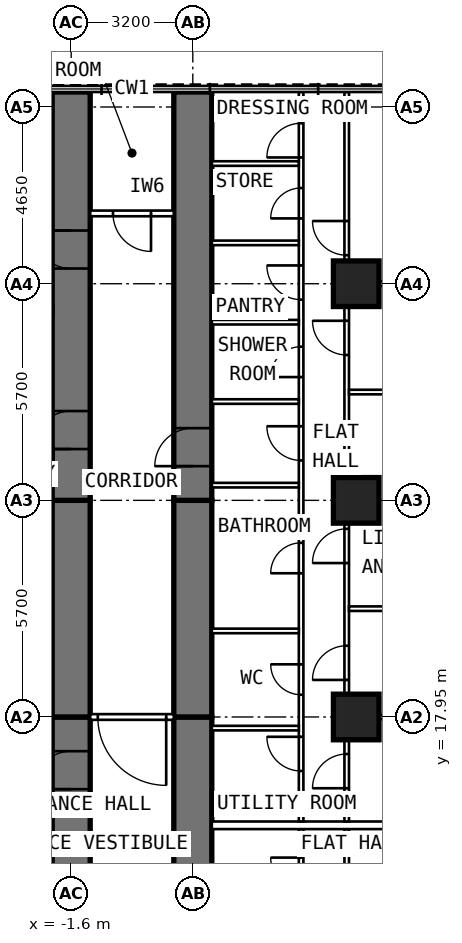
"""IFC4 building model, lengths in metres.
Left out: names, types, materials, properties, quantities, classifications, styles, units other than length and angle.
Written with IfcOpenShell. Run it as: python <this file> out.ifc"""

import sys

from ifc_helpers import new_model, si_unit, direction, frame, frame_2d, origin, origin_2d, place, context, subcontext, project, spatial, rectangle, extrude, element, fill, save


model = new_model("IFC4")
c1 = context("Model", 3, precision=1e-05, world=origin(), true_north=direction((0.0, 1.0)))
c2 = subcontext(c1, "Body", "Model", "MODEL_VIEW")
j1 = project(units=[si_unit("LENGTHUNIT", "METRE"), si_unit("PLANEANGLEUNIT", "RADIAN")], contexts=[c1])
p1 = place(None, origin())
s1 = spatial("IfcSite", under=j1, at=p1, CompositionType="ELEMENT")
p2 = place(p1, origin())
s2 = spatial("IfcBuilding", under=s1, at=p2, CompositionType="ELEMENT")
p3 = place(p2, frame((0.0, 0.0, 61.0)))
s3 = spatial("IfcBuildingStorey", under=s2, at=p3, CompositionType="ELEMENT", Elevation=61.0)
for number, where, z_axis, x_axis in (
    (1, (5.9, 17.95, 0.0), (0.0, 0.0, 1.0), (0.0, 1.0, 0.0)),
    (2, (5.9, 23.65, 0.0), (0.0, 0.0, 1.0), (0.0, 1.0, 0.0)),
    (3, (5.9, 29.35, 0.0), (0.0, 0.0, 1.0), (0.0, 1.0, 0.0)),
):
    element("IfcColumn", number, at=place(p3, frame(where, z_axis=z_axis, x_axis=x_axis)), inside=s3, PredefinedType="COLUMN", context=c2, shape_type="SweptSolid", body=[
        extrude(rectangle(XDim=1.2, YDim=1.2, at=origin_2d()), origin(), (0.0, 0.0, 1.0), 3.6),
    ])
p4 = place(p3, frame((-1.6, 9.6, 0.0), z_axis=(0.0, 0.0, 1.0), x_axis=(0.0, 1.0, 0.0)))
e4 = element("IfcWall", 4, at=p4, inside=s3, PredefinedType="SHEAR", context=c2, shape_type="SweptSolid", body=[
    extrude(rectangle(XDim=8.35, YDim=1.0, at=frame_2d((4.175, 0.0))), origin(), (0.0, 0.0, 1.0), 3.6),
])
p5 = place(p4, frame((6.45, 0.0, 0.0)))
e5 = element("IfcOpeningElement", 5, at=p5, cuts=e4, PredefinedType="OPENING", context=c2, shape_type="SweptSolid", body=[
    extrude(rectangle(XDim=1.0, YDim=2.1, at=frame_2d((0.5, 1.05))), frame((0.0, 0.512, 0.0), z_axis=(0.0, -1.0, 0.0), x_axis=(1.0, 0.0, 0.0)), (0.0, 0.0, 1.0), 1.024),
])
p6 = place(p3, frame((-1.6, 17.95, 0.0), z_axis=(0.0, 0.0, 1.0), x_axis=(0.0, 1.0, 0.0)))
e6 = element("IfcWall", 6, at=p6, inside=s3, PredefinedType="SHEAR", context=c2, shape_type="SweptSolid", body=[
    extrude(rectangle(XDim=5.7, YDim=1.0, at=frame_2d((2.85, 0.0))), origin(), (0.0, 0.0, 1.0), 3.6),
])
p7 = place(p3, frame((-1.6, 23.65, 0.0), z_axis=(0.0, 0.0, 1.0), x_axis=(0.0, 1.0, 0.0)))
e7 = element("IfcWall", 7, at=p7, inside=s3, PredefinedType="SHEAR", context=c2, shape_type="SweptSolid", body=[
    extrude(rectangle(XDim=10.745, YDim=1.0, at=frame_2d((5.373, 0.0))), origin(), (0.0, 0.0, 1.0), 3.6),
])
p8 = place(p7, frame((6.1, 0.0, 0.0)))
e8 = element("IfcOpeningElement", 8, at=p8, cuts=e7, PredefinedType="OPENING", context=c2, shape_type="SweptSolid", body=[
    extrude(rectangle(XDim=1.0, YDim=2.1, at=frame_2d((0.5, 1.05))), frame((0.0, 0.512, 0.0), z_axis=(0.0, -1.0, 0.0), x_axis=(1.0, 0.0, 0.0)), (0.0, 0.0, 1.0), 1.024),
])
p9 = place(p7, frame((1.35, 0.0, 0.0)))
e9 = element("IfcOpeningElement", 9, at=p9, cuts=e7, PredefinedType="OPENING", context=c2, shape_type="SweptSolid", body=[
    extrude(rectangle(XDim=1.0, YDim=2.1, at=frame_2d((0.5, 1.05))), frame((0.0, 0.512, 0.0), z_axis=(0.0, -1.0, 0.0), x_axis=(1.0, 0.0, 0.0)), (0.0, 0.0, 1.0), 1.024),
])
p10 = place(p3, frame((1.6, 9.6, 0.0), z_axis=(0.0, 0.0, 1.0), x_axis=(0.0, 1.0, 0.0)))
e10 = element("IfcWall", 10, at=p10, inside=s3, PredefinedType="SHEAR", context=c2, shape_type="SweptSolid", body=[
    extrude(rectangle(XDim=8.35, YDim=1.0, at=frame_2d((4.175, 0.0))), origin(), (0.0, 0.0, 1.0), 3.6),
])
p11 = place(p10, frame((1.3, 0.0, 0.0)))
e11 = element("IfcOpeningElement", 11, at=p11, cuts=e10, PredefinedType="OPENING", context=c2, shape_type="SweptSolid", body=[
    extrude(rectangle(XDim=1.0, YDim=2.1, at=frame_2d((0.5, 1.05))), frame((0.0, 0.512, 0.0), z_axis=(0.0, -1.0, 0.0), x_axis=(1.0, 0.0, 0.0)), (0.0, 0.0, 1.0), 1.024),
])
p12 = place(p3, frame((1.6, 17.95, 0.0), z_axis=(0.0, 0.0, 1.0), x_axis=(0.0, 1.0, 0.0)))
e12 = element("IfcWall", 12, at=p12, inside=s3, PredefinedType="SHEAR", context=c2, shape_type="SweptSolid", body=[
    extrude(rectangle(XDim=5.7, YDim=1.0, at=frame_2d((2.85, 0.0))), origin(), (0.0, 0.0, 1.0), 3.6),
])
p13 = place(p3, frame((1.6, 23.65, 0.0), z_axis=(0.0, 0.0, 1.0), x_axis=(0.0, 1.0, 0.0)))
e13 = element("IfcWall", 13, at=p13, inside=s3, PredefinedType="SHEAR", context=c2, shape_type="SweptSolid", body=[
    extrude(rectangle(XDim=10.745, YDim=1.0, at=frame_2d((5.373, 0.0))), origin(), (0.0, 0.0, 1.0), 3.6),
])
p14 = place(p13, frame((0.9, 0.0, 0.0)))
e14 = element("IfcOpeningElement", 14, at=p14, cuts=e13, PredefinedType="OPENING", context=c2, shape_type="SweptSolid", body=[
    extrude(rectangle(XDim=1.0, YDim=2.1, at=frame_2d((0.5, 1.05))), frame((0.0, 0.512, 0.0), z_axis=(0.0, -1.0, 0.0), x_axis=(1.0, 0.0, 0.0)), (0.0, 0.0, 1.0), 1.024),
])
p15 = place(p3, frame((4.45, 10.1, 0.0), z_axis=(0.0, 0.0, 1.0), x_axis=(0.0, 1.0, 0.0)))
e15 = element("IfcWall", 15, at=p15, inside=s3, PredefinedType="PARTITIONING", context=c2, shape_type="SweptSolid", body=[
    extrude(rectangle(XDim=4.9, YDim=0.12, at=frame_2d((2.45, 0.0))), origin(), (0.0, 0.0, 1.0), 3.35),
])
p16 = place(p15, frame((0.75, 0.0, 0.0)))
e16 = element("IfcOpeningElement", 16, at=p16, cuts=e15, PredefinedType="OPENING", context=c2, shape_type="SweptSolid", body=[
    extrude(rectangle(XDim=0.9, YDim=2.1, at=frame_2d((0.45, 1.05))), frame((0.0, 0.072, 0.0), z_axis=(0.0, -1.0, 0.0), x_axis=(1.0, 0.0, 0.0)), (0.0, 0.0, 1.0), 0.144),
])
p17 = place(p15, frame((3.35, 0.0, 0.0)))
e17 = element("IfcOpeningElement", 17, at=p17, cuts=e15, PredefinedType="OPENING", context=c2, shape_type="SweptSolid", body=[
    extrude(rectangle(XDim=0.8, YDim=2.1, at=frame_2d((0.4, 1.05))), frame((0.0, 0.072, 0.0), z_axis=(0.0, -1.0, 0.0), x_axis=(1.0, 0.0, 0.0)), (0.0, 0.0, 1.0), 0.144),
])
p18 = place(p3, frame((5.65, 9.6, 0.0), z_axis=(0.0, 0.0, 1.0), x_axis=(0.0, 1.0, 0.0)))
e18 = element("IfcWall", 18, at=p18, inside=s3, PredefinedType="PARTITIONING", context=c2, shape_type="SweptSolid", body=[
    extrude(rectangle(XDim=5.4, YDim=0.12, at=frame_2d((2.7, 0.0))), origin(), (0.0, 0.0, 1.0), 3.35),
])
p19 = place(p18, frame((3.4, 0.0, 0.0)))
e19 = element("IfcOpeningElement", 19, at=p19, cuts=e18, PredefinedType="OPENING", context=c2, shape_type="SweptSolid", body=[
    extrude(rectangle(XDim=0.9, YDim=2.1, at=frame_2d((0.45, 1.05))), frame((0.0, 0.072, 0.0), z_axis=(0.0, -1.0, 0.0), x_axis=(1.0, 0.0, 0.0)), (0.0, 0.0, 1.0), 0.144),
])
p20 = place(p3, frame((4.45, 15.2, 0.0), z_axis=(0.0, 0.0, 1.0), x_axis=(0.0, 1.0, 0.0)))
e20 = element("IfcWall", 20, at=p20, inside=s3, PredefinedType="PARTITIONING", context=c2, shape_type="SweptSolid", body=[
    extrude(rectangle(XDim=19.195, YDim=0.12, at=frame_2d((9.598, 0.0))), origin(), (0.0, 0.0, 1.0), 3.35),
])
p21 = place(p20, frame((1.329, 0.0, 0.0)))
e21 = element("IfcOpeningElement", 21, at=p21, cuts=e20, PredefinedType="OPENING", context=c2, shape_type="SweptSolid", body=[
    extrude(rectangle(XDim=0.9, YDim=2.1, at=frame_2d((0.45, 1.05))), frame((0.0, 0.072, 0.0), z_axis=(0.0, -1.0, 0.0), x_axis=(1.0, 0.0, 0.0)), (0.0, 0.0, 1.0), 0.144),
])
p22 = place(p20, frame((3.336, 0.0, 0.0)))
e22 = element("IfcOpeningElement", 22, at=p22, cuts=e20, PredefinedType="OPENING", context=c2, shape_type="SweptSolid", body=[
    extrude(rectangle(XDim=0.8, YDim=2.1, at=frame_2d((0.4, 1.05))), frame((0.0, 0.072, 0.0), z_axis=(0.0, -1.0, 0.0), x_axis=(1.0, 0.0, 0.0)), (0.0, 0.0, 1.0), 0.144),
])
p23 = place(p20, frame((6.532, 0.0, 0.0)))
e23 = element("IfcOpeningElement", 23, at=p23, cuts=e20, PredefinedType="OPENING", context=c2, shape_type="SweptSolid", body=[
    extrude(rectangle(XDim=0.8, YDim=2.1, at=frame_2d((0.4, 1.05))), frame((0.0, 0.072, 0.0), z_axis=(0.0, -1.0, 0.0), x_axis=(1.0, 0.0, 0.0)), (0.0, 0.0, 1.0), 0.144),
])
p24 = place(p20, frame((9.5, 0.0, 0.0)))
e24 = element("IfcOpeningElement", 24, at=p24, cuts=e20, PredefinedType="OPENING", context=c2, shape_type="SweptSolid", body=[
    extrude(rectangle(XDim=0.9, YDim=2.1, at=frame_2d((0.45, 1.05))), frame((0.0, 0.072, 0.0), z_axis=(0.0, -1.0, 0.0), x_axis=(1.0, 0.0, 0.0)), (0.0, 0.0, 1.0), 0.144),
])
p25 = place(p20, frame((11.694, 0.0, 0.0)))
e25 = element("IfcOpeningElement", 25, at=p25, cuts=e20, PredefinedType="OPENING", context=c2, shape_type="SweptSolid", body=[
    extrude(rectangle(XDim=0.8, YDim=2.1, at=frame_2d((0.4, 1.05))), frame((0.0, 0.072, 0.0), z_axis=(0.0, -1.0, 0.0), x_axis=(1.0, 0.0, 0.0)), (0.0, 0.0, 1.0), 0.144),
])
p26 = place(p20, frame((13.731, 0.0, 0.0)))
e26 = element("IfcOpeningElement", 26, at=p26, cuts=e20, PredefinedType="OPENING", context=c2, shape_type="SweptSolid", body=[
    extrude(rectangle(XDim=0.9, YDim=2.1, at=frame_2d((0.45, 1.05))), frame((0.0, 0.072, 0.0), z_axis=(0.0, -1.0, 0.0), x_axis=(1.0, 0.0, 0.0)), (0.0, 0.0, 1.0), 0.144),
])
p27 = place(p20, frame((15.869, 0.0, 0.0)))
e27 = element("IfcOpeningElement", 27, at=p27, cuts=e20, PredefinedType="OPENING", context=c2, shape_type="SweptSolid", body=[
    extrude(rectangle(XDim=0.8, YDim=2.1, at=frame_2d((0.4, 1.05))), frame((0.0, 0.072, 0.0), z_axis=(0.0, -1.0, 0.0), x_axis=(1.0, 0.0, 0.0)), (0.0, 0.0, 1.0), 0.144),
])
p28 = place(p20, frame((17.472, 0.0, 0.0)))
e28 = element("IfcOpeningElement", 28, at=p28, cuts=e20, PredefinedType="OPENING", context=c2, shape_type="SweptSolid", body=[
    extrude(rectangle(XDim=0.9, YDim=2.1, at=frame_2d((0.45, 1.05))), frame((0.0, 0.072, 0.0), z_axis=(0.0, -1.0, 0.0), x_axis=(1.0, 0.0, 0.0)), (0.0, 0.0, 1.0), 0.144),
])
p29 = place(p3, frame((5.65, 15.2, 0.0), z_axis=(0.0, 0.0, 1.0), x_axis=(0.0, 1.0, 0.0)))
e29 = element("IfcWall", 29, at=p29, inside=s3, PredefinedType="PARTITIONING", context=c2, shape_type="SweptSolid", body=[
    extrude(rectangle(XDim=19.195, YDim=0.12, at=frame_2d((9.598, 0.0))), origin(), (0.0, 0.0, 1.0), 3.35),
])
p30 = place(p29, frame((0.875, 0.0, 0.0)))
e30 = element("IfcOpeningElement", 30, at=p30, cuts=e29, PredefinedType="OPENING", context=c2, shape_type="SweptSolid", body=[
    extrude(rectangle(XDim=0.9, YDim=2.1, at=frame_2d((0.45, 1.05))), frame((0.0, 0.072, 0.0), z_axis=(0.0, -1.0, 0.0), x_axis=(1.0, 0.0, 0.0)), (0.0, 0.0, 1.0), 0.144),
])
p31 = place(p29, frame((3.725, 0.0, 0.0)))
e31 = element("IfcOpeningElement", 31, at=p31, cuts=e29, PredefinedType="OPENING", context=c2, shape_type="SweptSolid", body=[
    extrude(rectangle(XDim=0.9, YDim=2.1, at=frame_2d((0.45, 1.05))), frame((0.0, 0.072, 0.0), z_axis=(0.0, -1.0, 0.0), x_axis=(1.0, 0.0, 0.0)), (0.0, 0.0, 1.0), 0.144),
])
p32 = place(p29, frame((6.8, 0.0, 0.0)))
e32 = element("IfcOpeningElement", 32, at=p32, cuts=e29, PredefinedType="OPENING", context=c2, shape_type="SweptSolid", body=[
    extrude(rectangle(XDim=0.9, YDim=2.1, at=frame_2d((0.45, 1.05))), frame((0.0, 0.072, 0.0), z_axis=(0.0, -1.0, 0.0), x_axis=(1.0, 0.0, 0.0)), (0.0, 0.0, 1.0), 0.144),
])
p33 = place(p29, frame((12.275, 0.0, 0.0)))
e33 = element("IfcOpeningElement", 33, at=p33, cuts=e29, PredefinedType="OPENING", context=c2, shape_type="SweptSolid", body=[
    extrude(rectangle(XDim=0.9, YDim=2.1, at=frame_2d((0.45, 1.05))), frame((0.0, 0.072, 0.0), z_axis=(0.0, -1.0, 0.0), x_axis=(1.0, 0.0, 0.0)), (0.0, 0.0, 1.0), 0.144),
])
p34 = place(p29, frame((14.9, 0.0, 0.0)))
e34 = element("IfcOpeningElement", 34, at=p34, cuts=e29, PredefinedType="OPENING", context=c2, shape_type="SweptSolid", body=[
    extrude(rectangle(XDim=0.9, YDim=2.1, at=frame_2d((0.45, 1.05))), frame((0.0, 0.072, 0.0), z_axis=(0.0, -1.0, 0.0), x_axis=(1.0, 0.0, 0.0)), (0.0, 0.0, 1.0), 0.144),
])
p35 = place(p3, frame((5.71, 17.95, 0.0), z_axis=(0.0, 0.0, 1.0), x_axis=(1.0, 0.0, 0.0)))
e35 = element("IfcWall", 35, at=p35, inside=s3, PredefinedType="PARTITIONING", context=c2, shape_type="SweptSolid", body=[
    extrude(rectangle(XDim=4.99, YDim=0.12, at=frame_2d((2.495, 0.0))), origin(), (0.0, 0.0, 1.0), 2.45),
])
for number, where, z_axis, x_axis in (
    (36, (5.71, 20.8, 0.0), (0.0, 0.0, 1.0), (1.0, 0.0, 0.0)),
    (37, (5.71, 26.5, 0.0), (0.0, 0.0, 1.0), (1.0, 0.0, 0.0)),
):
    element("IfcWall", number, at=place(p3, frame(where, z_axis=z_axis, x_axis=x_axis)), inside=s3, PredefinedType="PARTITIONING", context=c2, shape_type="SweptSolid", body=[
        extrude(rectangle(XDim=4.99, YDim=0.12, at=frame_2d((2.495, 0.0))), origin(), (0.0, 0.0, 1.0), 3.35),
    ])
p36 = place(p3, frame((5.71, 29.35, 0.0), z_axis=(0.0, 0.0, 1.0), x_axis=(1.0, 0.0, 0.0)))
e38 = element("IfcWall", 38, at=p36, inside=s3, PredefinedType="PARTITIONING", context=c2, shape_type="SweptSolid", body=[
    extrude(rectangle(XDim=4.99, YDim=0.12, at=frame_2d((2.495, 0.0))), origin(), (0.0, 0.0, 1.0), 2.45),
])
p37 = place(p3, frame((2.1, 17.657, 0.0), z_axis=(0.0, 0.0, 1.0), x_axis=(1.0, 0.0, 0.0)))
e39 = element("IfcWall", 39, at=p37, inside=s3, PredefinedType="PARTITIONING", context=c2, shape_type="SweptSolid", body=[
    extrude(rectangle(XDim=2.29, YDim=0.12, at=frame_2d((1.145, 0.0))), origin(), (0.0, 0.0, 1.0), 2.45),
])
for number, where, z_axis, x_axis in (
    (40, (2.1, 20.214, 0.0), (0.0, 0.0, 1.0), (1.0, 0.0, 0.0)),
    (41, (2.1, 24.05, 0.0), (0.0, 0.0, 1.0), (1.0, 0.0, 0.0)),
    (42, (2.1, 26.25, 0.0), (0.0, 0.0, 1.0), (1.0, 0.0, 0.0)),
    (43, (2.1, 28.337, 0.0), (0.0, 0.0, 1.0), (1.0, 0.0, 0.0)),
    (44, (2.1, 30.425, 0.0), (0.0, 0.0, 1.0), (1.0, 0.0, 0.0)),
    (45, (2.1, 32.512, 0.0), (0.0, 0.0, 1.0), (1.0, 0.0, 0.0)),
):
    element("IfcWall", number, at=place(p3, frame(where, z_axis=z_axis, x_axis=x_axis)), inside=s3, PredefinedType="PARTITIONING", context=c2, shape_type="SweptSolid", body=[
        extrude(rectangle(XDim=2.29, YDim=0.12, at=frame_2d((1.145, 0.0))), origin(), (0.0, 0.0, 1.0), 3.35),
    ])
p38 = place(p3, frame((2.1, 15.1, 0.0), z_axis=(0.0, 0.0, 1.0), x_axis=(1.0, 0.0, 0.0)))
e46 = element("IfcWall", 46, at=p38, inside=s3, PredefinedType="PARTITIONING", context=c2, shape_type="SweptSolid", body=[
    extrude(rectangle(XDim=8.6, YDim=0.2, at=frame_2d((4.3, 0.0))), origin(), (0.0, 0.0, 1.0), 3.35),
])
p39 = place(p3, frame((1.1, 31.2, 0.0), z_axis=(0.0, 0.0, 1.0), x_axis=(-1.0, 0.0, 0.0)))
e47 = element("IfcWall", 47, at=p39, inside=s3, PredefinedType="PARTITIONING", context=c2, shape_type="SweptSolid", body=[
    extrude(rectangle(XDim=2.2, YDim=0.15, at=frame_2d((1.1, 0.0))), origin(), (0.0, 0.0, 1.0), 3.35),
])
p40 = place(p39, frame((0.6, 0.0, 0.0)))
e48 = element("IfcOpeningElement", 48, at=p40, cuts=e47, PredefinedType="OPENING", context=c2, shape_type="SweptSolid", body=[
    extrude(rectangle(XDim=1.0, YDim=2.1, at=frame_2d((0.5, 1.05))), frame((0.0, 0.087, 0.0), z_axis=(0.0, -1.0, 0.0), x_axis=(1.0, 0.0, 0.0)), (0.0, 0.0, 1.0), 0.174),
])
p41 = place(p3, frame((1.1, 17.95, 0.0), z_axis=(0.0, 0.0, 1.0), x_axis=(-1.0, 0.0, 0.0)))
e49 = element("IfcWall", 49, at=p41, inside=s3, PredefinedType="PARTITIONING", context=c2, shape_type="SweptSolid", body=[
    extrude(rectangle(XDim=2.2, YDim=0.15, at=frame_2d((1.1, 0.0))), origin(), (0.0, 0.0, 1.0), 3.35),
])
p42 = place(p41, frame((0.2, 0.0, 0.0)))
e50 = element("IfcOpeningElement", 50, at=p42, cuts=e49, PredefinedType="OPENING", context=c2, shape_type="SweptSolid", body=[
    extrude(rectangle(XDim=1.8, YDim=2.1, at=frame_2d((0.9, 1.05))), frame((0.0, 0.087, 0.0), z_axis=(0.0, -1.0, 0.0), x_axis=(1.0, 0.0, 0.0)), (0.0, 0.0, 1.0), 0.174),
])
p43 = place(p5, origin())
e51 = element("IfcDoor", 51, at=p43, inside=s3, OperationType="SINGLE_SWING_LEFT", PredefinedType="DOOR", context=c2, shape_type="SweptSolid", body=[
    extrude(rectangle(XDim=1.0, YDim=2.1, at=frame_2d((0.5, 1.05))), frame((0.0, 0.25, 0.0), z_axis=(0.0, -1.0, 0.0), x_axis=(1.0, 0.0, 0.0)), (0.0, 0.0, 1.0), 0.5),
])
fill(e5, e51)
p44 = place(p8, origin())
e52 = element("IfcDoor", 52, at=p44, inside=s3, OperationType="SINGLE_SWING_RIGHT", PredefinedType="DOOR", context=c2, shape_type="SweptSolid", body=[
    extrude(rectangle(XDim=1.0, YDim=2.1, at=frame_2d((0.5, 1.05))), frame((0.0, 0.25, 0.0), z_axis=(0.0, -1.0, 0.0), x_axis=(1.0, 0.0, 0.0)), (0.0, 0.0, 1.0), 0.5),
])
fill(e8, e52)
p45 = place(p17, origin())
e53 = element("IfcDoor", 53, at=p45, inside=s3, OperationType="SINGLE_SWING_RIGHT", PredefinedType="DOOR", context=c2, shape_type="SweptSolid", body=[
    extrude(rectangle(XDim=0.8, YDim=2.1, at=frame_2d((0.4, 1.05))), frame((0.0, 0.025, 0.0), z_axis=(0.0, -1.0, 0.0), x_axis=(1.0, 0.0, 0.0)), (0.0, 0.0, 1.0), 0.05),
])
fill(e17, e53)
p46 = place(p14, origin())
e54 = element("IfcDoor", 54, at=p46, inside=s3, OperationType="SINGLE_SWING_LEFT", PredefinedType="DOOR", context=c2, shape_type="SweptSolid", body=[
    extrude(rectangle(XDim=1.0, YDim=2.1, at=frame_2d((0.5, 1.05))), frame((0.0, 0.25, 0.0), z_axis=(0.0, -1.0, 0.0), x_axis=(1.0, 0.0, 0.0)), (0.0, 0.0, 1.0), 0.5),
])
fill(e14, e54)
p47 = place(p30, origin())
e55 = element("IfcDoor", 55, at=p47, inside=s3, OperationType="SINGLE_SWING_LEFT", PredefinedType="DOOR", context=c2, shape_type="SweptSolid", body=[
    extrude(rectangle(XDim=0.9, YDim=2.1, at=frame_2d((0.45, 1.05))), frame((0.0, 0.025, 0.0), z_axis=(0.0, -1.0, 0.0), x_axis=(1.0, 0.0, 0.0)), (0.0, 0.0, 1.0), 0.05),
])
fill(e30, e55)
p48 = place(p31, origin())
e56 = element("IfcDoor", 56, at=p48, inside=s3, OperationType="SINGLE_SWING_LEFT", PredefinedType="DOOR", context=c2, shape_type="SweptSolid", body=[
    extrude(rectangle(XDim=0.9, YDim=2.1, at=frame_2d((0.45, 1.05))), frame((0.0, 0.025, 0.0), z_axis=(0.0, -1.0, 0.0), x_axis=(1.0, 0.0, 0.0)), (0.0, 0.0, 1.0), 0.05),
])
fill(e31, e56)
p49 = place(p32, origin())
e57 = element("IfcDoor", 57, at=p49, inside=s3, OperationType="SINGLE_SWING_LEFT", PredefinedType="DOOR", context=c2, shape_type="SweptSolid", body=[
    extrude(rectangle(XDim=0.9, YDim=2.1, at=frame_2d((0.45, 1.05))), frame((0.0, 0.025, 0.0), z_axis=(0.0, -1.0, 0.0), x_axis=(1.0, 0.0, 0.0)), (0.0, 0.0, 1.0), 0.05),
])
fill(e32, e57)
p50 = place(p33, origin())
e58 = element("IfcDoor", 58, at=p50, inside=s3, OperationType="SINGLE_SWING_RIGHT", PredefinedType="DOOR", context=c2, shape_type="SweptSolid", body=[
    extrude(rectangle(XDim=0.9, YDim=2.1, at=frame_2d((0.45, 1.05))), frame((0.0, 0.025, 0.0), z_axis=(0.0, -1.0, 0.0), x_axis=(1.0, 0.0, 0.0)), (0.0, 0.0, 1.0), 0.05),
])
fill(e33, e58)
p51 = place(p34, origin())
e59 = element("IfcDoor", 59, at=p51, inside=s3, OperationType="SINGLE_SWING_RIGHT", PredefinedType="DOOR", context=c2, shape_type="SweptSolid", body=[
    extrude(rectangle(XDim=0.9, YDim=2.1, at=frame_2d((0.45, 1.05))), frame((0.0, 0.025, 0.0), z_axis=(0.0, -1.0, 0.0), x_axis=(1.0, 0.0, 0.0)), (0.0, 0.0, 1.0), 0.05),
])
fill(e34, e59)
p52 = place(p21, origin())
e60 = element("IfcDoor", 60, at=p52, inside=s3, OperationType="SINGLE_SWING_RIGHT", PredefinedType="DOOR", context=c2, shape_type="SweptSolid", body=[
    extrude(rectangle(XDim=0.9, YDim=2.1, at=frame_2d((0.45, 1.05))), frame((0.0, 0.025, 0.0), z_axis=(0.0, -1.0, 0.0), x_axis=(1.0, 0.0, 0.0)), (0.0, 0.0, 1.0), 0.05),
])
fill(e21, e60)
p53 = place(p22, origin())
e61 = element("IfcDoor", 61, at=p53, inside=s3, OperationType="SINGLE_SWING_RIGHT", PredefinedType="DOOR", context=c2, shape_type="SweptSolid", body=[
    extrude(rectangle(XDim=0.8, YDim=2.1, at=frame_2d((0.4, 1.05))), frame((0.0, 0.025, 0.0), z_axis=(0.0, -1.0, 0.0), x_axis=(1.0, 0.0, 0.0)), (0.0, 0.0, 1.0), 0.05),
])
fill(e22, e61)
p54 = place(p23, origin())
e62 = element("IfcDoor", 62, at=p54, inside=s3, OperationType="SINGLE_SWING_LEFT", PredefinedType="DOOR", context=c2, shape_type="SweptSolid", body=[
    extrude(rectangle(XDim=0.8, YDim=2.1, at=frame_2d((0.4, 1.05))), frame((0.0, 0.025, 0.0), z_axis=(0.0, -1.0, 0.0), x_axis=(1.0, 0.0, 0.0)), (0.0, 0.0, 1.0), 0.05),
])
fill(e23, e62)
p55 = place(p24, origin())
e63 = element("IfcDoor", 63, at=p55, inside=s3, OperationType="SINGLE_SWING_RIGHT", PredefinedType="DOOR", context=c2, shape_type="SweptSolid", body=[
    extrude(rectangle(XDim=0.9, YDim=2.1, at=frame_2d((0.45, 1.05))), frame((0.0, 0.025, 0.0), z_axis=(0.0, -1.0, 0.0), x_axis=(1.0, 0.0, 0.0)), (0.0, 0.0, 1.0), 0.05),
])
fill(e24, e63)
p56 = place(p25, origin())
e64 = element("IfcDoor", 64, at=p56, inside=s3, OperationType="SINGLE_SWING_LEFT", PredefinedType="DOOR", context=c2, shape_type="SweptSolid", body=[
    extrude(rectangle(XDim=0.8, YDim=2.1, at=frame_2d((0.4, 1.05))), frame((0.0, 0.025, 0.0), z_axis=(0.0, -1.0, 0.0), x_axis=(1.0, 0.0, 0.0)), (0.0, 0.0, 1.0), 0.05),
])
fill(e25, e64)
p57 = place(p26, origin())
e65 = element("IfcDoor", 65, at=p57, inside=s3, OperationType="SINGLE_SWING_RIGHT", PredefinedType="DOOR", context=c2, shape_type="SweptSolid", body=[
    extrude(rectangle(XDim=0.9, YDim=2.1, at=frame_2d((0.45, 1.05))), frame((0.0, 0.025, 0.0), z_axis=(0.0, -1.0, 0.0), x_axis=(1.0, 0.0, 0.0)), (0.0, 0.0, 1.0), 0.05),
])
fill(e26, e65)
p58 = place(p27, origin())
e66 = element("IfcDoor", 66, at=p58, inside=s3, OperationType="SINGLE_SWING_LEFT", PredefinedType="DOOR", context=c2, shape_type="SweptSolid", body=[
    extrude(rectangle(XDim=0.8, YDim=2.1, at=frame_2d((0.4, 1.05))), frame((0.0, 0.025, 0.0), z_axis=(0.0, -1.0, 0.0), x_axis=(1.0, 0.0, 0.0)), (0.0, 0.0, 1.0), 0.05),
])
fill(e27, e66)
p59 = place(p28, origin())
e67 = element("IfcDoor", 67, at=p59, inside=s3, OperationType="SINGLE_SWING_LEFT", PredefinedType="DOOR", context=c2, shape_type="SweptSolid", body=[
    extrude(rectangle(XDim=0.9, YDim=2.1, at=frame_2d((0.45, 1.05))), frame((0.0, 0.025, 0.0), z_axis=(0.0, -1.0, 0.0), x_axis=(1.0, 0.0, 0.0)), (0.0, 0.0, 1.0), 0.05),
])
fill(e28, e67)
p60 = place(p40, origin())
e68 = element("IfcDoor", 68, at=p60, inside=s3, OperationType="SINGLE_SWING_LEFT", PredefinedType="DOOR", context=c2, shape_type="SweptSolid", body=[
    extrude(rectangle(XDim=1.0, YDim=2.1, at=frame_2d((0.5, 1.05))), frame((0.0, 0.025, 0.0), z_axis=(0.0, -1.0, 0.0), x_axis=(1.0, 0.0, 0.0)), (0.0, 0.0, 1.0), 0.05),
])
fill(e48, e68)
p61 = place(p42, origin())
e69 = element("IfcDoor", 69, at=p61, inside=s3, OperationType="DOUBLE_DOOR_DOUBLE_SWING", PredefinedType="DOOR", context=c2, shape_type="SweptSolid", body=[
    extrude(rectangle(XDim=1.8, YDim=2.1, at=frame_2d((0.9, 1.05))), frame((0.0, 0.025, 0.0), z_axis=(0.0, -1.0, 0.0), x_axis=(1.0, 0.0, 0.0)), (0.0, 0.0, 1.0), 0.05),
])
fill(e50, e69)
p62 = place(p9, origin())
e70 = element("IfcDoor", 70, at=p62, inside=s3, OperationType="SINGLE_SWING_LEFT", PredefinedType="DOOR", context=c2, shape_type="SweptSolid", body=[
    extrude(rectangle(XDim=1.0, YDim=2.1, at=frame_2d((0.5, 1.05))), frame((0.0, 0.25, 0.0), z_axis=(0.0, -1.0, 0.0), x_axis=(1.0, 0.0, 0.0)), (0.0, 0.0, 1.0), 0.5),
])
fill(e9, e70)
save(model, sys.argv[1])
